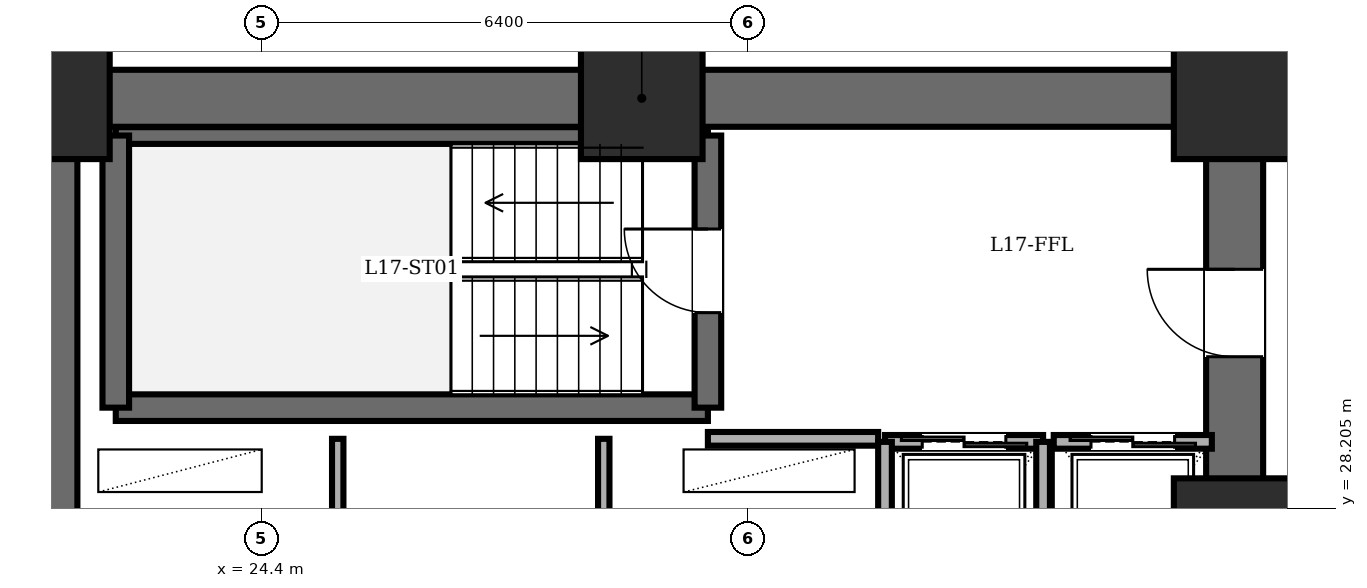
"""IFC4 building model, lengths in metres.
Left out: names, types, materials, properties, quantities, classifications, styles, units other than length and angle.
Written with IfcOpenShell. Run it as: python <this file> out.ifc"""

import sys

from ifc_helpers import new_model, si_unit, direction, frame, frame_2d, origin, origin_2d, place, context, subcontext, project, spatial, rectangle, extrude, element, fill, save


model = new_model("IFC4")
c1 = context("Model", 3, precision=1e-05, world=origin(), true_north=direction((0.0, 1.0)))
c2 = subcontext(c1, "Body", "Model", "MODEL_VIEW")
j1 = project(units=[si_unit("LENGTHUNIT", "METRE"), si_unit("PLANEANGLEUNIT", "RADIAN")], contexts=[c1])
p1 = place(None, origin())
s1 = spatial("IfcSite", under=j1, at=p1, CompositionType="ELEMENT")
p2 = place(p1, origin())
s2 = spatial("IfcBuilding", under=s1, at=p2, CompositionType="ELEMENT")
p3 = place(p2, frame((0.0, 0.0, 64.8)))
s3 = spatial("IfcBuildingStorey", under=s2, at=p3, CompositionType="ELEMENT", Elevation=64.8)
for number, where, z_axis, x_axis in (
    (1, (37.2, 27.8, 0.0), (0.0, 0.0, 1.0), (1.0, 0.0, 0.0)),
    (2, (37.2, 33.6, 0.0), (0.0, 0.0, 1.0), (1.0, 0.0, 0.0)),
    (3, (29.4, 33.6, 0.0), (0.0, 0.0, 1.0), (1.0, 0.0, 0.0)),
    (4, (21.6, 33.6, 0.0), (0.0, 0.0, 1.0), (1.0, 0.0, 0.0)),
):
    element("IfcColumn", number, at=place(p3, frame(where, z_axis=z_axis, x_axis=x_axis)), inside=s3, PredefinedType="COLUMN", context=c2, shape_type="SweptSolid", body=[
        extrude(rectangle(XDim=1.6, YDim=1.6, at=origin_2d()), origin(), (0.0, 0.0, 1.0), 3.6),
    ])
p4 = place(p3, frame((21.6, 14.4, 0.0), z_axis=(0.0, 0.0, 1.0), x_axis=(0.0, 1.0, 0.0)))
e5 = element("IfcWall", 5, at=p4, inside=s3, PredefinedType="SHEAR", context=c2, shape_type="SweptSolid", body=[
    extrude(rectangle(XDim=19.2, YDim=0.75, at=frame_2d((9.6, 0.0))), origin(), (0.0, 0.0, 1.0), 3.4),
])
p5 = place(p3, frame((21.6, 33.6, 0.0), z_axis=(0.0, 0.0, 1.0), x_axis=(1.0, 0.0, 0.0)))
e6 = element("IfcWall", 6, at=p5, inside=s3, PredefinedType="SHEAR", context=c2, shape_type="SweptSolid", body=[
    extrude(rectangle(XDim=15.6, YDim=0.75, at=frame_2d((7.8, 0.0))), origin(), (0.0, 0.0, 1.0), 3.4),
])
p6 = place(p3, frame((37.2, 14.4, 0.0), z_axis=(0.0, 0.0, 1.0), x_axis=(0.0, 1.0, 0.0)))
e7 = element("IfcWall", 7, at=p6, inside=s3, PredefinedType="SHEAR", context=c2, shape_type="SweptSolid", body=[
    extrude(rectangle(XDim=19.2, YDim=0.75, at=frame_2d((9.6, 0.0))), origin(), (0.0, 0.0, 1.0), 3.4),
])
p7 = place(p6, frame((15.8, 0.0, 0.0)))
e8 = element("IfcOpeningElement", 8, at=p7, cuts=e7, PredefinedType="OPENING", context=c2, shape_type="SweptSolid", body=[
    extrude(rectangle(XDim=1.15, YDim=2.15, at=frame_2d((0.575, 1.075))), frame((0.0, 0.385, 0.0), z_axis=(0.0, -1.0, 0.0), x_axis=(1.0, 0.0, 0.0)), (0.0, 0.0, 1.0), 0.77),
])
p8 = place(p6, frame((3.6, 0.0, 0.0)))
e9 = element("IfcOpeningElement", 9, at=p8, cuts=e7, PredefinedType="OPENING", context=c2, shape_type="SweptSolid", body=[
    extrude(rectangle(XDim=1.1, YDim=2.15, at=frame_2d((0.55, 1.075))), frame((0.0, 0.385, 0.0), z_axis=(0.0, -1.0, 0.0), x_axis=(1.0, 0.0, 0.0)), (0.0, 0.0, 1.0), 0.77),
])
p9 = place(p6, frame((8.6, 0.0, 0.0)))
e10 = element("IfcOpeningElement", 10, at=p9, cuts=e7, PredefinedType="OPENING", context=c2, shape_type="SweptSolid", body=[
    extrude(rectangle(XDim=1.3, YDim=2.2, at=frame_2d((0.65, 1.1))), frame((0.0, 0.385, 0.0), z_axis=(0.0, -1.0, 0.0), x_axis=(1.0, 0.0, 0.0)), (0.0, 0.0, 1.0), 0.77),
])
p10 = place(p3, frame((22.48, 29.53, 0.0), z_axis=(0.0, 0.0, 1.0), x_axis=(1.0, 0.0, 0.0)))
e11 = element("IfcWall", 11, at=p10, inside=s3, PredefinedType="SOLIDWALL", context=c2, shape_type="SweptSolid", body=[
    extrude(rectangle(XDim=7.79, YDim=0.35, at=frame_2d((3.895, 0.0))), origin(), (0.0, 0.0, 1.0), 3.4),
])
p11 = place(p3, frame((22.48, 33.11, 0.0), z_axis=(0.0, 0.0, 1.0), x_axis=(1.0, 0.0, 0.0)))
e12 = element("IfcWall", 12, at=p11, inside=s3, PredefinedType="PARTITIONING", context=c2, shape_type="SweptSolid", body=[
    extrude(rectangle(XDim=7.79, YDim=0.22, at=frame_2d((3.895, 0.0))), origin(), (0.0, 0.0, 1.0), 3.4),
])
p12 = place(p3, frame((22.48, 29.53, 0.0), z_axis=(0.0, 0.0, 1.0), x_axis=(0.0, 1.0, 0.0)))
e13 = element("IfcWall", 13, at=p12, inside=s3, PredefinedType="SOLIDWALL", context=c2, shape_type="SweptSolid", body=[
    extrude(rectangle(XDim=3.58, YDim=0.35, at=frame_2d((1.79, 0.0))), origin(), (0.0, 0.0, 1.0), 3.4),
])
p13 = place(p3, frame((30.27, 29.53, 0.0), z_axis=(0.0, 0.0, 1.0), x_axis=(0.0, 1.0, 0.0)))
e14 = element("IfcWall", 14, at=p13, inside=s3, PredefinedType="SOLIDWALL", context=c2, shape_type="SweptSolid", body=[
    extrude(rectangle(XDim=3.58, YDim=0.35, at=frame_2d((1.79, 0.0))), origin(), (0.0, 0.0, 1.0), 3.4),
])
p14 = place(p13, frame((1.25, 0.0, 0.0)))
e15 = element("IfcOpeningElement", 15, at=p14, cuts=e14, PredefinedType="OPENING", context=c2, shape_type="SweptSolid", body=[
    extrude(rectangle(XDim=1.1, YDim=2.15, at=frame_2d((0.55, 1.075))), frame((0.0, 0.185, 0.0), z_axis=(0.0, -1.0, 0.0), x_axis=(1.0, 0.0, 0.0)), (0.0, 0.0, 1.0), 0.37),
])
p15 = place(p3, frame((30.27, 29.12, 0.0), z_axis=(0.0, 0.0, 1.0), x_axis=(1.0, 0.0, 0.0)))
e16 = element("IfcWall", 16, at=p15, inside=s3, PredefinedType="PARTITIONING", context=c2, shape_type="SweptSolid", body=[
    extrude(rectangle(XDim=2.24, YDim=0.18, at=frame_2d((1.12, 0.0))), origin(), (0.0, 0.0, 1.0), 3.4),
])
for number, where, z_axis, x_axis in (
    (17, (25.4, 27.6, 0.0), (0.0, 0.0, 1.0), (0.0, 1.0, 0.0)),
    (18, (28.9, 27.6, 0.0), (0.0, 0.0, 1.0), (0.0, 1.0, 0.0)),
):
    element("IfcWall", number, at=place(p3, frame(where, z_axis=z_axis, x_axis=x_axis)), inside=s3, PredefinedType="PARTITIONING", context=c2, shape_type="SweptSolid", body=[
        extrude(rectangle(XDim=1.52, YDim=0.15, at=frame_2d((0.76, 0.0))), origin(), (0.0, 0.0, 1.0), 3.4),
    ])
p16 = place(p3, frame((32.6, 29.08, 0.0), z_axis=(0.0, 0.0, 1.0), x_axis=(1.0, 0.0, 0.0)))
e19 = element("IfcWall", 19, at=p16, inside=s3, PredefinedType="PARTITIONING", context=c2, shape_type="SweptSolid", body=[
    extrude(rectangle(XDim=2.08, YDim=0.18, at=frame_2d((1.04, 0.0))), origin(), (0.0, 0.0, 1.0), 3.4),
])
p17 = place(p16, frame((0.49, 0.0, 0.0)))
e20 = element("IfcOpeningElement", 20, at=p17, cuts=e19, PredefinedType="OPENING", context=c2, shape_type="SweptSolid", body=[
    extrude(rectangle(XDim=1.1, YDim=2.2, at=frame_2d((0.55, 1.1))), frame((0.0, 0.1, 0.0), z_axis=(0.0, -1.0, 0.0), x_axis=(1.0, 0.0, 0.0)), (0.0, 0.0, 1.0), 0.2),
])
for number, where, z_axis, x_axis in (
    (21, (34.68, 26.35, 0.0), (0.0, 0.0, 1.0), (0.0, 1.0, 0.0)),
    (22, (32.6, 29.08, 0.0), (0.0, 0.0, 1.0), (0.0, -1.0, 0.0)),
):
    element("IfcWall", number, at=place(p3, frame(where, z_axis=z_axis, x_axis=x_axis)), inside=s3, PredefinedType="PARTITIONING", context=c2, shape_type="SweptSolid", body=[
        extrude(rectangle(XDim=2.73, YDim=0.18, at=frame_2d((1.365, 0.0))), origin(), (0.0, 0.0, 1.0), 3.4),
    ])
p18 = place(p3, frame((34.82, 29.08, 0.0), z_axis=(0.0, 0.0, 1.0), x_axis=(1.0, 0.0, 0.0)))
e23 = element("IfcWall", 23, at=p18, inside=s3, PredefinedType="PARTITIONING", context=c2, shape_type="SweptSolid", body=[
    extrude(rectangle(XDim=2.08, YDim=0.18, at=frame_2d((1.04, 0.0))), origin(), (0.0, 0.0, 1.0), 3.4),
])
p19 = place(p18, frame((0.49, 0.0, 0.0)))
e24 = element("IfcOpeningElement", 24, at=p19, cuts=e23, PredefinedType="OPENING", context=c2, shape_type="SweptSolid", body=[
    extrude(rectangle(XDim=1.1, YDim=2.2, at=frame_2d((0.55, 1.1))), frame((0.0, 0.1, 0.0), z_axis=(0.0, -1.0, 0.0), x_axis=(1.0, 0.0, 0.0)), (0.0, 0.0, 1.0), 0.2),
])
p20 = place(p14, origin())
e25 = element("IfcDoor", 25, at=p20, inside=s3, OperationType="SINGLE_SWING_RIGHT", PredefinedType="DOOR", context=c2, shape_type="SweptSolid", body=[
    extrude(rectangle(XDim=1.1, YDim=2.15, at=frame_2d((0.55, 1.075))), frame((0.0, 0.025, 0.0), z_axis=(0.0, -1.0, 0.0), x_axis=(1.0, 0.0, 0.0)), (0.0, 0.0, 1.0), 0.05),
])
fill(e15, e25)
p21 = place(p7, origin())
e26 = element("IfcDoor", 26, at=p21, inside=s3, OperationType="SINGLE_SWING_RIGHT", PredefinedType="DOOR", context=c2, shape_type="SweptSolid", body=[
    extrude(rectangle(XDim=1.15, YDim=2.15, at=frame_2d((0.575, 1.075))), frame((0.0, 0.025, 0.0), z_axis=(0.0, -1.0, 0.0), x_axis=(1.0, 0.0, 0.0)), (0.0, 0.0, 1.0), 0.05),
])
fill(e8, e26)
p22 = place(p17, origin())
e27 = element("IfcDoor", 27, at=p22, inside=s3, OperationType="DOUBLE_DOOR_SLIDING", PredefinedType="DOOR", context=c2, shape_type="SweptSolid", body=[
    extrude(rectangle(XDim=1.1, YDim=2.2, at=frame_2d((0.55, 1.1))), frame((0.0, 0.025, 0.0), z_axis=(0.0, -1.0, 0.0), x_axis=(1.0, 0.0, 0.0)), (0.0, 0.0, 1.0), 0.05),
])
fill(e20, e27)
p23 = place(p19, origin())
e28 = element("IfcDoor", 28, at=p23, inside=s3, OperationType="DOUBLE_DOOR_SLIDING", PredefinedType="DOOR", context=c2, shape_type="SweptSolid", body=[
    extrude(rectangle(XDim=1.1, YDim=2.2, at=frame_2d((0.55, 1.1))), frame((0.0, 0.025, 0.0), z_axis=(0.0, -1.0, 0.0), x_axis=(1.0, 0.0, 0.0)), (0.0, 0.0, 1.0), 0.05),
])
fill(e24, e28)
save(model, sys.argv[1])
